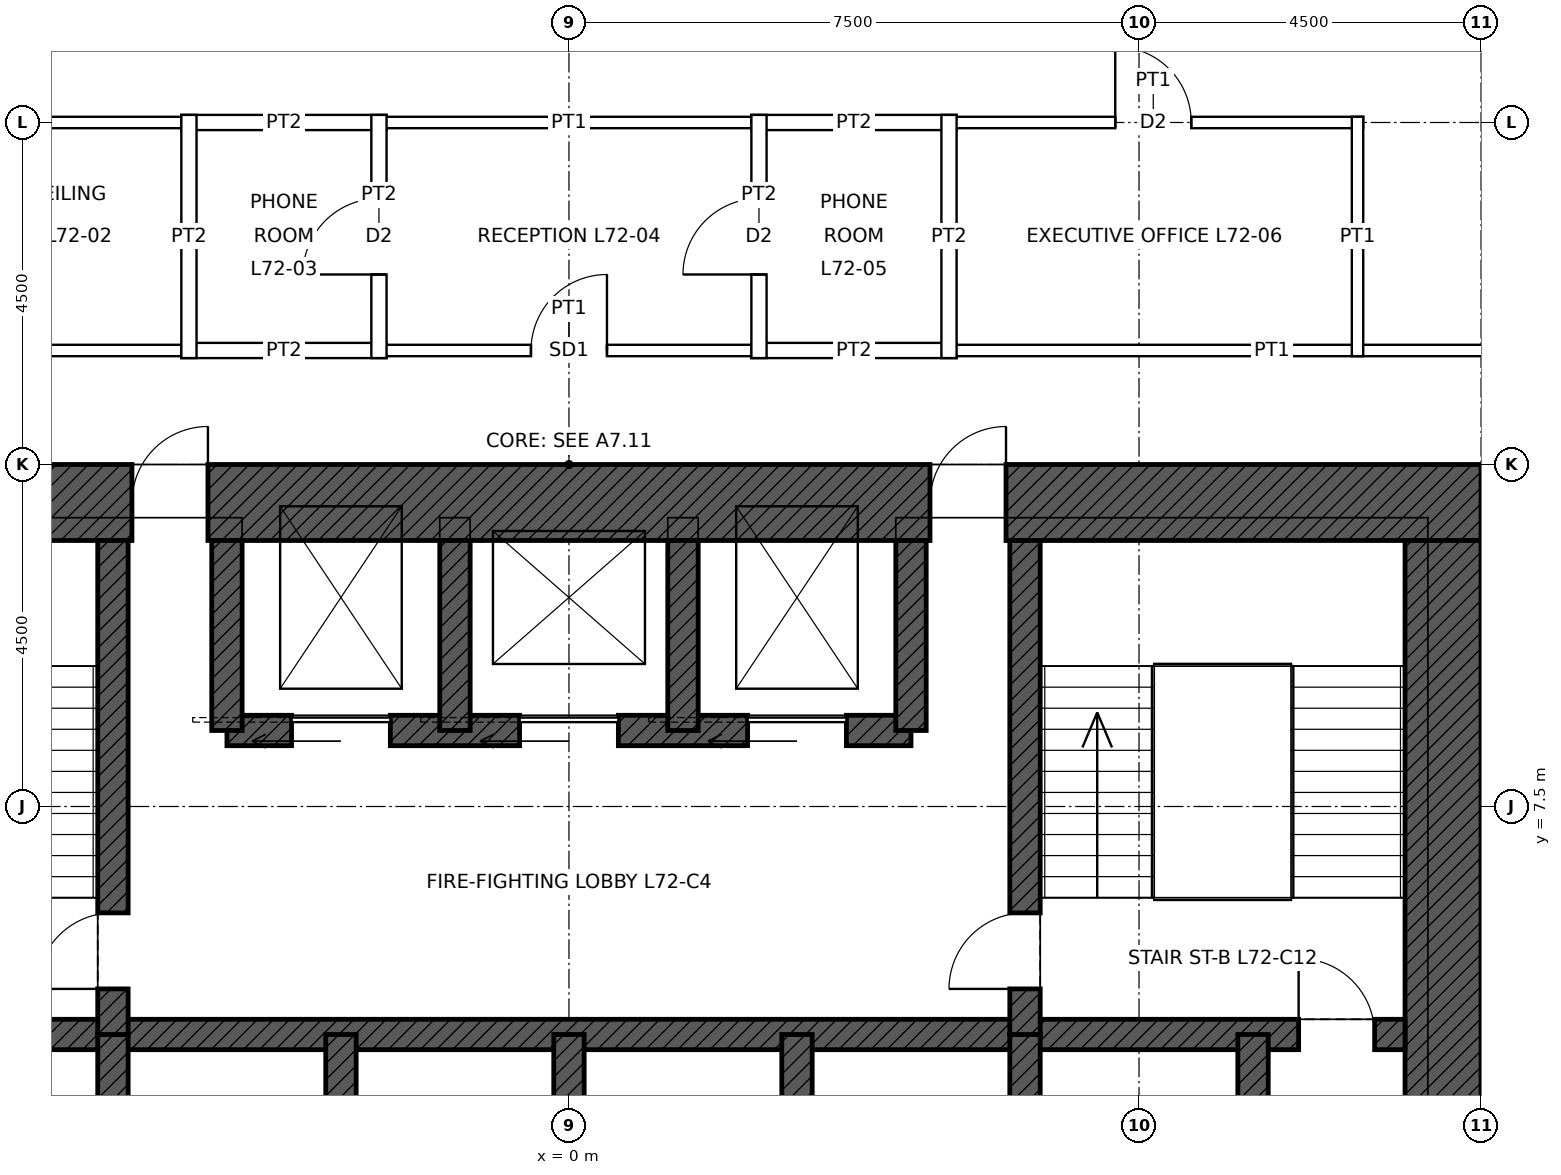
"""IFC4 building model, lengths in metres.
Left out: names, types, materials, properties, quantities, classifications, styles, units other than length and angle.
Written with IfcOpenShell. Run it as: python <this file> out.ifc"""

import sys

from ifc_helpers import new_model, si_unit, direction, frame, frame_2d, origin, place, context, subcontext, project, spatial, rectangle, extrude, element, fill, save


model = new_model("IFC4")
c1 = context("Model", 3, precision=1e-05, world=origin(), true_north=direction((0.0, 1.0)))
c2 = subcontext(c1, "Body", "Model", "MODEL_VIEW")
j1 = project(units=[si_unit("LENGTHUNIT", "METRE"), si_unit("PLANEANGLEUNIT", "RADIAN")], contexts=[c1])
p1 = place(None, origin())
s1 = spatial("IfcSite", under=j1, at=p1, CompositionType="ELEMENT")
p2 = place(p1, origin())
s2 = spatial("IfcBuilding", under=s1, at=p2, CompositionType="ELEMENT")
p3 = place(p2, frame((0.0, 0.0, 323.9)))
s3 = spatial("IfcBuildingStorey", under=s2, at=p3, CompositionType="ELEMENT", Elevation=323.9)
p4 = place(p3, frame((-12.0, 11.5, 0.0), z_axis=(0.0, 0.0, 1.0), x_axis=(1.0, 0.0, 0.0)))
e1 = element("IfcWall", 1, at=p4, inside=s3, PredefinedType="SHEAR", context=c2, shape_type="SweptSolid", body=[
    extrude(rectangle(XDim=24.0, YDim=1.0, at=frame_2d((12.0, 0.0))), origin(), (0.0, 0.0, 1.0), 4.0),
])
p5 = place(p4, frame((6.25, 0.0, 0.0)))
e2 = element("IfcOpeningElement", 2, at=p5, cuts=e1, PredefinedType="OPENING", context=c2, shape_type="SweptSolid", body=[
    extrude(rectangle(XDim=1.0, YDim=2.4, at=frame_2d((0.5, 1.2))), frame((0.0, 0.51, 0.0), z_axis=(0.0, -1.0, 0.0), x_axis=(1.0, 0.0, 0.0)), (0.0, 0.0, 1.0), 1.02),
])
p6 = place(p4, frame((16.75, 0.0, 0.0)))
e3 = element("IfcOpeningElement", 3, at=p6, cuts=e1, PredefinedType="OPENING", context=c2, shape_type="SweptSolid", body=[
    extrude(rectangle(XDim=1.0, YDim=2.4, at=frame_2d((0.5, 1.2))), frame((0.0, 0.51, 0.0), z_axis=(0.0, -1.0, 0.0), x_axis=(1.0, 0.0, 0.0)), (0.0, 0.0, 1.0), 1.02),
])
p7 = place(p3, frame((11.5, 11.0, 0.0), z_axis=(0.0, 0.0, 1.0), x_axis=(0.0, -1.0, 0.0)))
e4 = element("IfcWall", 4, at=p7, inside=s3, PredefinedType="SHEAR", context=c2, shape_type="SweptSolid", body=[
    extrude(rectangle(XDim=22.0, YDim=1.0, at=frame_2d((11.0, 0.0))), origin(), (0.0, 0.0, 1.0), 4.0),
])
p8 = place(p7, frame((10.5, 0.0, 0.0)))
e5 = element("IfcOpeningElement", 5, at=p8, cuts=e4, PredefinedType="OPENING", context=c2, shape_type="SweptSolid", body=[
    extrude(rectangle(XDim=1.0, YDim=2.4, at=frame_2d((0.5, 1.2))), frame((0.0, 0.51, 0.0), z_axis=(0.0, -1.0, 0.0), x_axis=(1.0, 0.0, 0.0)), (0.0, 0.0, 1.0), 1.02),
])
p9 = place(p3, frame((-11.0, 4.5, 0.0), z_axis=(0.0, 0.0, 1.0), x_axis=(1.0, 0.0, 0.0)))
e6 = element("IfcWall", 6, at=p9, inside=s3, PredefinedType="SHEAR", context=c2, shape_type="SweptSolid", body=[
    extrude(rectangle(XDim=22.0, YDim=0.4, at=frame_2d((11.0, 0.0))), origin(), (0.0, 0.0, 1.0), 4.0),
])
p10 = place(p9, frame((0.4, 0.0, 0.0)))
e7 = element("IfcOpeningElement", 7, at=p10, cuts=e6, PredefinedType="OPENING", context=c2, shape_type="SweptSolid", body=[
    extrude(rectangle(XDim=1.0, YDim=2.1, at=frame_2d((0.5, 1.05))), frame((0.0, 0.21, 0.0), z_axis=(0.0, -1.0, 0.0), x_axis=(1.0, 0.0, 0.0)), (0.0, 0.0, 1.0), 0.42),
])
p11 = place(p9, frame((20.6, 0.0, 0.0)))
e8 = element("IfcOpeningElement", 8, at=p11, cuts=e6, PredefinedType="OPENING", context=c2, shape_type="SweptSolid", body=[
    extrude(rectangle(XDim=1.0, YDim=2.1, at=frame_2d((0.5, 1.05))), frame((0.0, 0.21, 0.0), z_axis=(0.0, -1.0, 0.0), x_axis=(1.0, 0.0, 0.0)), (0.0, 0.0, 1.0), 0.42),
])
p12 = place(p3, frame((-4.5, 8.5, 0.0), z_axis=(0.0, 0.0, 1.0), x_axis=(1.0, 0.0, 0.0)))
e9 = element("IfcWall", 9, at=p12, inside=s3, PredefinedType="SHEAR", context=c2, shape_type="SweptSolid", body=[
    extrude(rectangle(XDim=9.0, YDim=0.4, at=frame_2d((4.5, 0.0))), origin(), (0.0, 0.0, 1.0), 4.0),
])
p13 = place(p12, frame((0.85, 0.0, 0.0)))
e10 = element("IfcOpeningElement", 10, at=p13, cuts=e9, PredefinedType="OPENING", context=c2, shape_type="SweptSolid", body=[
    extrude(rectangle(XDim=1.3, YDim=2.4, at=frame_2d((0.65, 1.2))), frame((0.0, 0.21, 0.0), z_axis=(0.0, -1.0, 0.0), x_axis=(1.0, 0.0, 0.0)), (0.0, 0.0, 1.0), 0.42),
])
p14 = place(p12, frame((6.85, 0.0, 0.0)))
e11 = element("IfcOpeningElement", 11, at=p14, cuts=e9, PredefinedType="OPENING", context=c2, shape_type="SweptSolid", body=[
    extrude(rectangle(XDim=1.3, YDim=2.4, at=frame_2d((0.65, 1.2))), frame((0.0, 0.21, 0.0), z_axis=(0.0, -1.0, 0.0), x_axis=(1.0, 0.0, 0.0)), (0.0, 0.0, 1.0), 0.42),
])
p15 = place(p12, frame((3.85, 0.0, 0.0)))
e12 = element("IfcOpeningElement", 12, at=p15, cuts=e9, PredefinedType="OPENING", context=c2, shape_type="SweptSolid", body=[
    extrude(rectangle(XDim=1.3, YDim=2.4, at=frame_2d((0.65, 1.2))), frame((0.0, 0.21, 0.0), z_axis=(0.0, -1.0, 0.0), x_axis=(1.0, 0.0, 0.0)), (0.0, 0.0, 1.0), 0.42),
])
for number, where, z_axis, x_axis in (
    (13, (9.0, 1.5, 0.0), (0.0, 0.0, 1.0), (0.0, 1.0, 0.0)),
    (14, (-6.0, 1.5, 0.0), (0.0, 0.0, 1.0), (0.0, 1.0, 0.0)),
    (15, (-3.0, 1.5, 0.0), (0.0, 0.0, 1.0), (0.0, 1.0, 0.0)),
    (16, (0.0, 1.5, 0.0), (0.0, 0.0, 1.0), (0.0, 1.0, 0.0)),
    (17, (3.0, 1.5, 0.0), (0.0, 0.0, 1.0), (0.0, 1.0, 0.0)),
    (18, (6.0, 1.5, 0.0), (0.0, 0.0, 1.0), (0.0, 1.0, 0.0)),
):
    element("IfcWall", number, at=place(p3, frame(where, z_axis=z_axis, x_axis=x_axis)), inside=s3, PredefinedType="SHEAR", context=c2, shape_type="SweptSolid", body=[
        extrude(rectangle(XDim=3.0, YDim=0.4, at=frame_2d((1.5, 0.0))), origin(), (0.0, 0.0, 1.0), 4.0),
    ])
p16 = place(p3, frame((-6.0, 4.5, 0.0), z_axis=(0.0, 0.0, 1.0), x_axis=(0.0, 1.0, 0.0)))
e19 = element("IfcWall", 19, at=p16, inside=s3, PredefinedType="SHEAR", context=c2, shape_type="SweptSolid", body=[
    extrude(rectangle(XDim=6.5, YDim=0.4, at=frame_2d((3.25, 0.0))), origin(), (0.0, 0.0, 1.0), 4.0),
])
p17 = place(p16, frame((0.6, 0.0, 0.0)))
e20 = element("IfcOpeningElement", 20, at=p17, cuts=e19, PredefinedType="OPENING", context=c2, shape_type="SweptSolid", body=[
    extrude(rectangle(XDim=1.0, YDim=2.1, at=frame_2d((0.5, 1.05))), frame((0.0, 0.21, 0.0), z_axis=(0.0, -1.0, 0.0), x_axis=(1.0, 0.0, 0.0)), (0.0, 0.0, 1.0), 0.42),
])
p18 = place(p3, frame((6.0, 4.5, 0.0), z_axis=(0.0, 0.0, 1.0), x_axis=(0.0, 1.0, 0.0)))
e21 = element("IfcWall", 21, at=p18, inside=s3, PredefinedType="SHEAR", context=c2, shape_type="SweptSolid", body=[
    extrude(rectangle(XDim=6.5, YDim=0.4, at=frame_2d((3.25, 0.0))), origin(), (0.0, 0.0, 1.0), 4.0),
])
p19 = place(p18, frame((0.6, 0.0, 0.0)))
e22 = element("IfcOpeningElement", 22, at=p19, cuts=e21, PredefinedType="OPENING", context=c2, shape_type="SweptSolid", body=[
    extrude(rectangle(XDim=1.0, YDim=2.1, at=frame_2d((0.5, 1.05))), frame((0.0, 0.21, 0.0), z_axis=(0.0, -1.0, 0.0), x_axis=(1.0, 0.0, 0.0)), (0.0, 0.0, 1.0), 0.42),
])
for number, where, z_axis, x_axis in (
    (23, (-4.5, 8.5, 0.0), (0.0, 0.0, 1.0), (0.0, 1.0, 0.0)),
    (24, (4.5, 8.5, 0.0), (0.0, 0.0, 1.0), (0.0, 1.0, 0.0)),
    (25, (-1.5, 8.5, 0.0), (0.0, 0.0, 1.0), (0.0, 1.0, 0.0)),
    (26, (1.5, 8.5, 0.0), (0.0, 0.0, 1.0), (0.0, 1.0, 0.0)),
):
    element("IfcWall", number, at=place(p3, frame(where, z_axis=z_axis, x_axis=x_axis)), inside=s3, PredefinedType="SHEAR", context=c2, shape_type="SweptSolid", body=[
        extrude(rectangle(XDim=2.5, YDim=0.4, at=frame_2d((1.25, 0.0))), origin(), (0.0, 0.0, 1.0), 4.0),
    ])
p20 = place(p3, frame((-12.075, 13.5, 0.0), z_axis=(0.0, 0.0, 1.0), x_axis=(1.0, 0.0, 0.0)))
e27 = element("IfcWall", 27, at=p20, inside=s3, PredefinedType="PARTITIONING", context=c2, shape_type="SweptSolid", body=[
    extrude(rectangle(XDim=7.15, YDim=0.15, at=frame_2d((3.575, 0.0))), origin(), (0.0, 0.0, 1.0), 3.85),
])
p21 = place(p3, frame((-5.1, 13.5, 0.0), z_axis=(0.0, 0.0, 1.0), x_axis=(1.0, 0.0, 0.0)))
e28 = element("IfcWall", 28, at=p21, inside=s3, PredefinedType="PARTITIONING", context=c2, shape_type="SweptSolid", body=[
    extrude(rectangle(XDim=2.7, YDim=0.2, at=frame_2d((1.35, 0.0))), origin(), (0.0, 0.0, 1.0), 3.85),
])
p22 = place(p3, frame((-2.575, 13.5, 0.0), z_axis=(0.0, 0.0, 1.0), x_axis=(1.0, 0.0, 0.0)))
e29 = element("IfcWall", 29, at=p22, inside=s3, PredefinedType="PARTITIONING", context=c2, shape_type="SweptSolid", body=[
    extrude(rectangle(XDim=5.15, YDim=0.15, at=frame_2d((2.575, 0.0))), origin(), (0.0, 0.0, 1.0), 3.85),
])
p23 = place(p22, frame((2.075, 0.0, 0.0)))
e30 = element("IfcOpeningElement", 30, at=p23, cuts=e29, PredefinedType="OPENING", context=c2, shape_type="SweptSolid", body=[
    extrude(rectangle(XDim=1.0, YDim=2.4, at=frame_2d((0.5, 1.2))), frame((0.0, 0.085, 0.0), z_axis=(0.0, -1.0, 0.0), x_axis=(1.0, 0.0, 0.0)), (0.0, 0.0, 1.0), 0.17),
])
p24 = place(p3, frame((2.4, 13.5, 0.0), z_axis=(0.0, 0.0, 1.0), x_axis=(1.0, 0.0, 0.0)))
e31 = element("IfcWall", 31, at=p24, inside=s3, PredefinedType="PARTITIONING", context=c2, shape_type="SweptSolid", body=[
    extrude(rectangle(XDim=2.7, YDim=0.2, at=frame_2d((1.35, 0.0))), origin(), (0.0, 0.0, 1.0), 3.85),
])
p25 = place(p3, frame((4.925, 13.5, 0.0), z_axis=(0.0, 0.0, 1.0), x_axis=(1.0, 0.0, 0.0)))
e32 = element("IfcWall", 32, at=p25, inside=s3, PredefinedType="PARTITIONING", context=c2, shape_type="SweptSolid", body=[
    extrude(rectangle(XDim=8.65, YDim=0.15, at=frame_2d((4.325, 0.0))), origin(), (0.0, 0.0, 1.0), 3.85),
])
p26 = place(p3, frame((-10.45, 16.5, 0.0), z_axis=(0.0, 0.0, 1.0), x_axis=(1.0, 0.0, 0.0)))
e33 = element("IfcWall", 33, at=p26, inside=s3, PredefinedType="PARTITIONING", context=c2, shape_type="SweptSolid", body=[
    extrude(rectangle(XDim=5.525, YDim=0.15, at=frame_2d((2.762, 0.0))), origin(), (0.0, 0.0, 1.0), 3.85),
])
p27 = place(p26, frame((2.262, 0.0, 0.0)))
e34 = element("IfcOpeningElement", 34, at=p27, cuts=e33, PredefinedType="OPENING", context=c2, shape_type="SweptSolid", body=[
    extrude(rectangle(XDim=1.0, YDim=2.1, at=frame_2d((0.5, 1.05))), frame((0.0, 0.085, 0.0), z_axis=(0.0, -1.0, 0.0), x_axis=(1.0, 0.0, 0.0)), (0.0, 0.0, 1.0), 0.17),
])
p28 = place(p3, frame((-5.1, 16.5, 0.0), z_axis=(0.0, 0.0, 1.0), x_axis=(1.0, 0.0, 0.0)))
e35 = element("IfcWall", 35, at=p28, inside=s3, PredefinedType="PARTITIONING", context=c2, shape_type="SweptSolid", body=[
    extrude(rectangle(XDim=2.7, YDim=0.2, at=frame_2d((1.35, 0.0))), origin(), (0.0, 0.0, 1.0), 3.85),
])
p29 = place(p3, frame((-2.575, 16.5, 0.0), z_axis=(0.0, 0.0, 1.0), x_axis=(1.0, 0.0, 0.0)))
e36 = element("IfcWall", 36, at=p29, inside=s3, PredefinedType="PARTITIONING", context=c2, shape_type="SweptSolid", body=[
    extrude(rectangle(XDim=5.15, YDim=0.15, at=frame_2d((2.575, 0.0))), origin(), (0.0, 0.0, 1.0), 3.85),
])
p30 = place(p3, frame((2.4, 16.5, 0.0), z_axis=(0.0, 0.0, 1.0), x_axis=(1.0, 0.0, 0.0)))
e37 = element("IfcWall", 37, at=p30, inside=s3, PredefinedType="PARTITIONING", context=c2, shape_type="SweptSolid", body=[
    extrude(rectangle(XDim=2.7, YDim=0.2, at=frame_2d((1.35, 0.0))), origin(), (0.0, 0.0, 1.0), 3.85),
])
p31 = place(p3, frame((4.925, 16.5, 0.0), z_axis=(0.0, 0.0, 1.0), x_axis=(1.0, 0.0, 0.0)))
e38 = element("IfcWall", 38, at=p31, inside=s3, PredefinedType="PARTITIONING", context=c2, shape_type="SweptSolid", body=[
    extrude(rectangle(XDim=5.525, YDim=0.15, at=frame_2d((2.762, 0.0))), origin(), (0.0, 0.0, 1.0), 3.85),
])
p32 = place(p31, frame((2.262, 0.0, 0.0)))
e39 = element("IfcOpeningElement", 39, at=p32, cuts=e38, PredefinedType="OPENING", context=c2, shape_type="SweptSolid", body=[
    extrude(rectangle(XDim=1.0, YDim=2.1, at=frame_2d((0.5, 1.05))), frame((0.0, 0.085, 0.0), z_axis=(0.0, -1.0, 0.0), x_axis=(1.0, 0.0, 0.0)), (0.0, 0.0, 1.0), 0.17),
])
p33 = place(p3, frame((-5.0, 13.4, 0.0), z_axis=(0.0, 0.0, 1.0), x_axis=(0.0, 1.0, 0.0)))
e40 = element("IfcWall", 40, at=p33, inside=s3, PredefinedType="PARTITIONING", context=c2, shape_type="SweptSolid", body=[
    extrude(rectangle(XDim=3.2, YDim=0.2, at=frame_2d((1.6, 0.0))), origin(), (0.0, 0.0, 1.0), 3.85),
])
p34 = place(p3, frame((-2.5, 13.4, 0.0), z_axis=(0.0, 0.0, 1.0), x_axis=(0.0, 1.0, 0.0)))
e41 = element("IfcWall", 41, at=p34, inside=s3, PredefinedType="PARTITIONING", context=c2, shape_type="SweptSolid", body=[
    extrude(rectangle(XDim=3.2, YDim=0.2, at=frame_2d((1.6, 0.0))), origin(), (0.0, 0.0, 1.0), 3.85),
])
p35 = place(p34, frame((1.1, 0.0, 0.0)))
e42 = element("IfcOpeningElement", 42, at=p35, cuts=e41, PredefinedType="OPENING", context=c2, shape_type="SweptSolid", body=[
    extrude(rectangle(XDim=1.0, YDim=2.1, at=frame_2d((0.5, 1.05))), frame((0.0, 0.11, 0.0), z_axis=(0.0, -1.0, 0.0), x_axis=(1.0, 0.0, 0.0)), (0.0, 0.0, 1.0), 0.22),
])
p36 = place(p3, frame((2.5, 13.4, 0.0), z_axis=(0.0, 0.0, 1.0), x_axis=(0.0, 1.0, 0.0)))
e43 = element("IfcWall", 43, at=p36, inside=s3, PredefinedType="PARTITIONING", context=c2, shape_type="SweptSolid", body=[
    extrude(rectangle(XDim=3.2, YDim=0.2, at=frame_2d((1.6, 0.0))), origin(), (0.0, 0.0, 1.0), 3.85),
])
p37 = place(p36, frame((1.1, 0.0, 0.0)))
e44 = element("IfcOpeningElement", 44, at=p37, cuts=e43, PredefinedType="OPENING", context=c2, shape_type="SweptSolid", body=[
    extrude(rectangle(XDim=1.0, YDim=2.1, at=frame_2d((0.5, 1.05))), frame((0.0, 0.11, 0.0), z_axis=(0.0, -1.0, 0.0), x_axis=(1.0, 0.0, 0.0)), (0.0, 0.0, 1.0), 0.22),
])
p38 = place(p3, frame((5.0, 13.4, 0.0), z_axis=(0.0, 0.0, 1.0), x_axis=(0.0, 1.0, 0.0)))
e45 = element("IfcWall", 45, at=p38, inside=s3, PredefinedType="PARTITIONING", context=c2, shape_type="SweptSolid", body=[
    extrude(rectangle(XDim=3.2, YDim=0.2, at=frame_2d((1.6, 0.0))), origin(), (0.0, 0.0, 1.0), 3.85),
])
p39 = place(p3, frame((10.375, 13.425, 0.0), z_axis=(0.0, 0.0, 1.0), x_axis=(0.0, 1.0, 0.0)))
e46 = element("IfcWall", 46, at=p39, inside=s3, PredefinedType="PARTITIONING", context=c2, shape_type="SweptSolid", body=[
    extrude(rectangle(XDim=3.15, YDim=0.15, at=frame_2d((1.575, 0.0))), origin(), (0.0, 0.0, 1.0), 3.85),
])
p40 = place(p11, origin())
e47 = element("IfcDoor", 47, at=p40, inside=s3, OperationType="SINGLE_SWING_LEFT", PredefinedType="DOOR", context=c2, shape_type="SweptSolid", body=[
    extrude(rectangle(XDim=1.0, YDim=2.1, at=frame_2d((0.5, 1.05))), frame((0.0, 0.025, 0.0), z_axis=(0.0, -1.0, 0.0), x_axis=(1.0, 0.0, 0.0)), (0.0, 0.0, 1.0), 0.05),
])
fill(e8, e47)
p41 = place(p17, origin())
e48 = element("IfcDoor", 48, at=p41, inside=s3, OperationType="SINGLE_SWING_LEFT", PredefinedType="DOOR", context=c2, shape_type="SweptSolid", body=[
    extrude(rectangle(XDim=1.0, YDim=2.1, at=frame_2d((0.5, 1.05))), frame((0.0, 0.025, 0.0), z_axis=(0.0, -1.0, 0.0), x_axis=(1.0, 0.0, 0.0)), (0.0, 0.0, 1.0), 0.05),
])
fill(e20, e48)
p42 = place(p19, origin())
e49 = element("IfcDoor", 49, at=p42, inside=s3, OperationType="SINGLE_SWING_LEFT", PredefinedType="DOOR", context=c2, shape_type="SweptSolid", body=[
    extrude(rectangle(XDim=1.0, YDim=2.1, at=frame_2d((0.5, 1.05))), frame((0.0, 0.025, 0.0), z_axis=(0.0, -1.0, 0.0), x_axis=(1.0, 0.0, 0.0)), (0.0, 0.0, 1.0), 0.05),
])
fill(e22, e49)
p43 = place(p5, origin())
e50 = element("IfcDoor", 50, at=p43, inside=s3, OperationType="SINGLE_SWING_RIGHT", PredefinedType="DOOR", context=c2, shape_type="SweptSolid", body=[
    extrude(rectangle(XDim=1.0, YDim=2.4, at=frame_2d((0.5, 1.2))), frame((0.0, 0.485, 0.0), z_axis=(0.0, -1.0, 0.0), x_axis=(1.0, 0.0, 0.0)), (0.0, 0.0, 1.0), 0.05),
])
fill(e2, e50)
p44 = place(p6, origin())
e51 = element("IfcDoor", 51, at=p44, inside=s3, OperationType="SINGLE_SWING_RIGHT", PredefinedType="DOOR", context=c2, shape_type="SweptSolid", body=[
    extrude(rectangle(XDim=1.0, YDim=2.4, at=frame_2d((0.5, 1.2))), frame((0.0, 0.485, 0.0), z_axis=(0.0, -1.0, 0.0), x_axis=(1.0, 0.0, 0.0)), (0.0, 0.0, 1.0), 0.05),
])
fill(e3, e51)
p45 = place(p13, origin())
e52 = element("IfcDoor", 52, at=p45, inside=s3, OperationType="SLIDING_TO_LEFT", PredefinedType="DOOR", context=c2, shape_type="SweptSolid", body=[
    extrude(rectangle(XDim=1.3, YDim=2.4, at=frame_2d((0.65, 1.2))), frame((0.0, 0.025, 0.0), z_axis=(0.0, -1.0, 0.0), x_axis=(1.0, 0.0, 0.0)), (0.0, 0.0, 1.0), 0.05),
])
fill(e10, e52)
p46 = place(p14, origin())
e53 = element("IfcDoor", 53, at=p46, inside=s3, OperationType="SLIDING_TO_LEFT", PredefinedType="DOOR", context=c2, shape_type="SweptSolid", body=[
    extrude(rectangle(XDim=1.3, YDim=2.4, at=frame_2d((0.65, 1.2))), frame((0.0, 0.025, 0.0), z_axis=(0.0, -1.0, 0.0), x_axis=(1.0, 0.0, 0.0)), (0.0, 0.0, 1.0), 0.05),
])
fill(e11, e53)
p47 = place(p15, origin())
e54 = element("IfcDoor", 54, at=p47, inside=s3, OperationType="SLIDING_TO_LEFT", PredefinedType="DOOR", context=c2, shape_type="SweptSolid", body=[
    extrude(rectangle(XDim=1.3, YDim=2.4, at=frame_2d((0.65, 1.2))), frame((0.0, 0.025, 0.0), z_axis=(0.0, -1.0, 0.0), x_axis=(1.0, 0.0, 0.0)), (0.0, 0.0, 1.0), 0.05),
])
fill(e12, e54)
p48 = place(p35, origin())
e55 = element("IfcDoor", 55, at=p48, inside=s3, OperationType="SINGLE_SWING_LEFT", PredefinedType="DOOR", context=c2, shape_type="SweptSolid", body=[
    extrude(rectangle(XDim=1.0, YDim=2.1, at=frame_2d((0.5, 1.05))), frame((0.0, 0.025, 0.0), z_axis=(0.0, -1.0, 0.0), x_axis=(1.0, 0.0, 0.0)), (0.0, 0.0, 1.0), 0.05),
])
fill(e42, e55)
p49 = place(p23, origin())
e56 = element("IfcDoor", 56, at=p49, inside=s3, OperationType="SINGLE_SWING_RIGHT", PredefinedType="DOOR", context=c2, shape_type="SweptSolid", body=[
    extrude(rectangle(XDim=1.0, YDim=2.4, at=frame_2d((0.5, 1.2))), frame((0.0, 0.025, 0.0), z_axis=(0.0, -1.0, 0.0), x_axis=(1.0, 0.0, 0.0)), (0.0, 0.0, 1.0), 0.05),
])
fill(e30, e56)
p50 = place(p37, origin())
e57 = element("IfcDoor", 57, at=p50, inside=s3, OperationType="SINGLE_SWING_LEFT", PredefinedType="DOOR", context=c2, shape_type="SweptSolid", body=[
    extrude(rectangle(XDim=1.0, YDim=2.1, at=frame_2d((0.5, 1.05))), frame((0.0, 0.025, 0.0), z_axis=(0.0, -1.0, 0.0), x_axis=(1.0, 0.0, 0.0)), (0.0, 0.0, 1.0), 0.05),
])
fill(e44, e57)
p51 = place(p32, origin())
e58 = element("IfcDoor", 58, at=p51, inside=s3, OperationType="SINGLE_SWING_LEFT", PredefinedType="DOOR", context=c2, shape_type="SweptSolid", body=[
    extrude(rectangle(XDim=1.0, YDim=2.1, at=frame_2d((0.5, 1.05))), frame((0.0, 0.025, 0.0), z_axis=(0.0, -1.0, 0.0), x_axis=(1.0, 0.0, 0.0)), (0.0, 0.0, 1.0), 0.05),
])
fill(e39, e58)
save(model, sys.argv[1])
